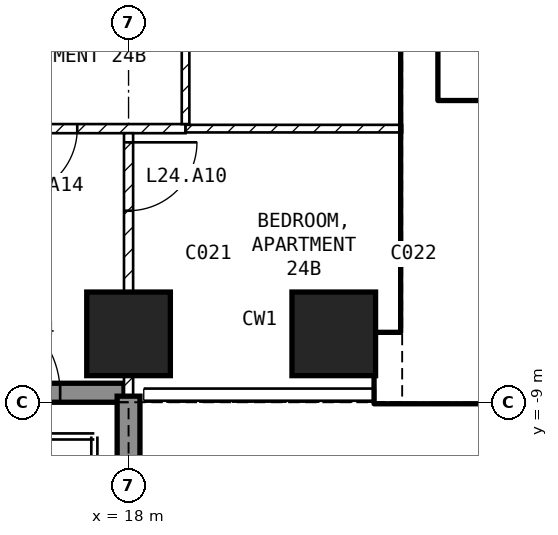
"""IFC4 building model, lengths in metres.
Left out: names, types, materials, properties, quantities, classifications, styles, units other than length and angle.
Written with IfcOpenShell. Run it as: python <this file> out.ifc"""

import sys

from ifc_helpers import new_model, si_unit, direction, frame, frame_2d, origin, origin_2d, place, context, subcontext, project, spatial, rectangle, extrude, element, fill, save


model = new_model("IFC4")
c1 = context("Model", 3, precision=1e-05, world=origin(), true_north=direction((0.0, 1.0)))
c2 = subcontext(c1, "Body", "Model", "MODEL_VIEW")
j1 = project(units=[si_unit("LENGTHUNIT", "METRE"), si_unit("PLANEANGLEUNIT", "RADIAN")], contexts=[c1])
p1 = place(None, origin())
s1 = spatial("IfcSite", under=j1, at=p1, CompositionType="ELEMENT")
p2 = place(p1, origin())
s2 = spatial("IfcBuilding", under=s1, at=p2, CompositionType="ELEMENT")
p3 = place(p2, frame((0.0, 0.0, 105.9)))
s3 = spatial("IfcBuildingStorey", under=s2, at=p3, CompositionType="ELEMENT", Elevation=105.9)
for number, where, z_axis, x_axis in (
    (1, (18.0, -8.1, -0.25), (0.0, 0.0, 1.0), (1.0, 0.0, 0.0)),
    (2, (20.7, -8.1, -0.25), (0.0, 0.0, 1.0), (1.0, 0.0, 0.0)),
):
    element("IfcColumn", number, at=place(p3, frame(where, z_axis=z_axis, x_axis=x_axis)), inside=s3, PredefinedType="COLUMN", context=c2, shape_type="SweptSolid", body=[
        extrude(rectangle(XDim=1.1, YDim=1.1, at=origin_2d()), origin(), (0.0, 0.0, 1.0), 3.5),
    ])
p4 = place(p3, frame((15.65, -8.875, 0.0), z_axis=(0.0, 0.0, 1.0), x_axis=(1.0, 0.0, 0.0)))
e3 = element("IfcWall", 3, at=p4, inside=s3, PredefinedType="SOLIDWALL", context=c2, shape_type="SweptSolid", body=[
    extrude(rectangle(XDim=2.29, YDim=0.25, at=frame_2d((1.145, 0.0))), origin(), (0.0, 0.0, 1.0), 3.25),
])
p5 = place(p4, frame((0.25, 0.0, 0.0)))
e4 = element("IfcOpeningElement", 4, at=p5, cuts=e3, PredefinedType="OPENING", context=c2, shape_type="SweptSolid", body=[
    extrude(rectangle(XDim=1.2, YDim=2.4, at=frame_2d((0.6, 1.2))), frame((0.0, 0.135, 0.0), z_axis=(0.0, -1.0, 0.0), x_axis=(1.0, 0.0, 0.0)), (0.0, 0.0, 1.0), 0.27),
])
p6 = place(p3, frame((18.0, -8.92, 0.0), z_axis=(0.0, 0.0, 1.0), x_axis=(0.0, -1.0, 0.0)))
e5 = element("IfcWall", 5, at=p6, inside=s3, PredefinedType="SOLIDWALL", context=c2, shape_type="SweptSolid", body=[
    extrude(rectangle(XDim=2.82, YDim=0.3, at=frame_2d((1.41, 0.0))), origin(), (0.0, 0.0, 1.0), 3.25),
])
p7 = place(p3, frame((21.25, -8.55, 0.0), z_axis=(0.0, 0.0, 1.0), x_axis=(1.0, 0.0, 0.0)))
e6 = element("IfcWall", 6, at=p7, inside=s3, PredefinedType="SHEAR", context=c2, shape_type="SweptSolid", body=[
    extrude(rectangle(XDim=8.95, YDim=0.9, at=frame_2d((4.475, 0.0))), origin(), (0.0, 0.0, 1.0), 3.25),
])
p8 = place(p3, frame((21.825, -8.1, 0.0), z_axis=(0.0, 0.0, 1.0), x_axis=(0.0, 1.0, 0.0)))
e7 = element("IfcWall", 7, at=p8, inside=s3, PredefinedType="SHEAR", context=c2, shape_type="SweptSolid", body=[
    extrude(rectangle(XDim=6.9, YDim=0.45, at=frame_2d((3.45, 0.0))), origin(), (0.0, 0.0, 1.0), 3.25),
])
p9 = place(p3, frame((22.05, -5.15, 0.0), z_axis=(0.0, 0.0, 1.0), x_axis=(1.0, 0.0, 0.0)))
e8 = element("IfcWall", 8, at=p9, inside=s3, PredefinedType="SOLIDWALL", context=c2, shape_type="SweptSolid", body=[
    extrude(rectangle(XDim=6.3, YDim=0.2, at=frame_2d((3.15, 0.0))), origin(), (0.0, 0.0, 1.0), 3.25),
])
p10 = place(p9, frame((0.2, 0.0, 0.0)))
e9 = element("IfcOpeningElement", 9, at=p10, cuts=e8, PredefinedType="OPENING", context=c2, shape_type="SweptSolid", body=[
    extrude(rectangle(XDim=1.0, YDim=2.1, at=frame_2d((0.5, 1.05))), frame((0.0, 0.11, 0.0), z_axis=(0.0, -1.0, 0.0), x_axis=(1.0, 0.0, 0.0)), (0.0, 0.0, 1.0), 0.22),
])
p11 = place(p3, frame((18.75, -5.4, 0.0), z_axis=(0.0, 0.0, 1.0), x_axis=(-1.0, 0.0, 0.0)))
e10 = element("IfcWall", 10, at=p11, inside=s3, PredefinedType="PARTITIONING", context=c2, shape_type="SweptSolid", body=[
    extrude(rectangle(XDim=9.81, YDim=0.12, at=frame_2d((4.905, 0.0))), origin(), (0.0, 0.0, 1.0), 3.25),
])
p12 = place(p11, frame((7.5, 0.0, 0.0)))
e11 = element("IfcOpeningElement", 11, at=p12, cuts=e10, PredefinedType="OPENING", context=c2, shape_type="SweptSolid", body=[
    extrude(rectangle(XDim=0.9, YDim=2.1, at=frame_2d((0.45, 1.05))), frame((0.0, 0.07, 0.0), z_axis=(0.0, -1.0, 0.0), x_axis=(1.0, 0.0, 0.0)), (0.0, 0.0, 1.0), 0.14),
])
p13 = place(p11, frame((1.425, 0.0, 0.0)))
e12 = element("IfcOpeningElement", 12, at=p13, cuts=e10, PredefinedType="OPENING", context=c2, shape_type="SweptSolid", body=[
    extrude(rectangle(XDim=0.9, YDim=2.1, at=frame_2d((0.45, 1.05))), frame((0.0, 0.07, 0.0), z_axis=(0.0, -1.0, 0.0), x_axis=(1.0, 0.0, 0.0)), (0.0, 0.0, 1.0), 0.14),
])
p14 = place(p3, frame((18.75, -1.3, 0.0), z_axis=(0.0, 0.0, 1.0), x_axis=(0.0, -1.0, 0.0)))
e13 = element("IfcWall", 13, at=p14, inside=s3, PredefinedType="PARTITIONING", context=c2, shape_type="SweptSolid", body=[
    extrude(rectangle(XDim=4.04, YDim=0.1, at=frame_2d((2.02, 0.0))), origin(), (0.0, 0.0, 1.0), 3.25),
])
p15 = place(p14, frame((1.595, 0.0, 0.0)))
e14 = element("IfcOpeningElement", 14, at=p15, cuts=e13, PredefinedType="OPENING", context=c2, shape_type="SweptSolid", body=[
    extrude(rectangle(XDim=0.85, YDim=2.1, at=frame_2d((0.425, 1.05))), frame((0.0, 0.06, 0.0), z_axis=(0.0, -1.0, 0.0), x_axis=(1.0, 0.0, 0.0)), (0.0, 0.0, 1.0), 0.12),
])
p16 = place(p3, frame((21.6, -5.4, 0.0), z_axis=(0.0, 0.0, 1.0), x_axis=(-1.0, 0.0, 0.0)))
e15 = element("IfcWall", 15, at=p16, inside=s3, PredefinedType="PARTITIONING", context=c2, shape_type="SweptSolid", body=[
    extrude(rectangle(XDim=2.85, YDim=0.1, at=frame_2d((1.425, 0.0))), origin(), (0.0, 0.0, 1.0), 3.25),
])
p17 = place(p3, frame((18.0, -5.46, 0.0), z_axis=(0.0, 0.0, 1.0), x_axis=(0.0, -1.0, 0.0)))
e16 = element("IfcWall", 16, at=p17, inside=s3, PredefinedType="PARTITIONING", context=c2, shape_type="SweptSolid", body=[
    extrude(rectangle(XDim=3.46, YDim=0.12, at=frame_2d((1.73, 0.0))), origin(), (0.0, 0.0, 1.0), 2.414),
])
p18 = place(p17, frame((0.12, 0.0, 0.0)))
e17 = element("IfcOpeningElement", 17, at=p18, cuts=e16, PredefinedType="OPENING", context=c2, shape_type="SweptSolid", body=[
    extrude(rectangle(XDim=0.9, YDim=2.1, at=frame_2d((0.45, 1.05))), frame((0.0, 0.07, 0.0), z_axis=(0.0, -1.0, 0.0), x_axis=(1.0, 0.0, 0.0)), (0.0, 0.0, 1.0), 0.14),
])
p19 = place(p5, origin())
e18 = element("IfcDoor", 18, at=p19, inside=s3, OperationType="SINGLE_SWING_LEFT", PredefinedType="DOOR", context=c2, shape_type="SweptSolid", body=[
    extrude(rectangle(XDim=1.2, YDim=2.4, at=frame_2d((0.6, 1.2))), frame((0.0, 0.025, 0.0), z_axis=(0.0, -1.0, 0.0), x_axis=(1.0, 0.0, 0.0)), (0.0, 0.0, 1.0), 0.05),
])
fill(e4, e18)
p20 = place(p10, origin())
e19 = element("IfcDoor", 19, at=p20, inside=s3, OperationType="SINGLE_SWING_LEFT", PredefinedType="DOOR", context=c2, shape_type="SweptSolid", body=[
    extrude(rectangle(XDim=1.0, YDim=2.1, at=frame_2d((0.5, 1.05))), frame((0.0, 0.025, 0.0), z_axis=(0.0, -1.0, 0.0), x_axis=(1.0, 0.0, 0.0)), (0.0, 0.0, 1.0), 0.05),
])
fill(e9, e19)
p21 = place(p18, origin())
e20 = element("IfcDoor", 20, at=p21, inside=s3, OperationType="SINGLE_SWING_LEFT", PredefinedType="DOOR", context=c2, shape_type="SweptSolid", body=[
    extrude(rectangle(XDim=0.9, YDim=2.1, at=frame_2d((0.45, 1.05))), frame((0.0, 0.025, 0.0), z_axis=(0.0, -1.0, 0.0), x_axis=(1.0, 0.0, 0.0)), (0.0, 0.0, 1.0), 0.05),
])
fill(e17, e20)
p22 = place(p13, origin())
e21 = element("IfcDoor", 21, at=p22, inside=s3, OperationType="SINGLE_SWING_RIGHT", PredefinedType="DOOR", context=c2, shape_type="SweptSolid", body=[
    extrude(rectangle(XDim=0.9, YDim=2.1, at=frame_2d((0.45, 1.05))), frame((0.0, 0.025, 0.0), z_axis=(0.0, -1.0, 0.0), x_axis=(1.0, 0.0, 0.0)), (0.0, 0.0, 1.0), 0.05),
])
fill(e12, e21)
save(model, sys.argv[1])
